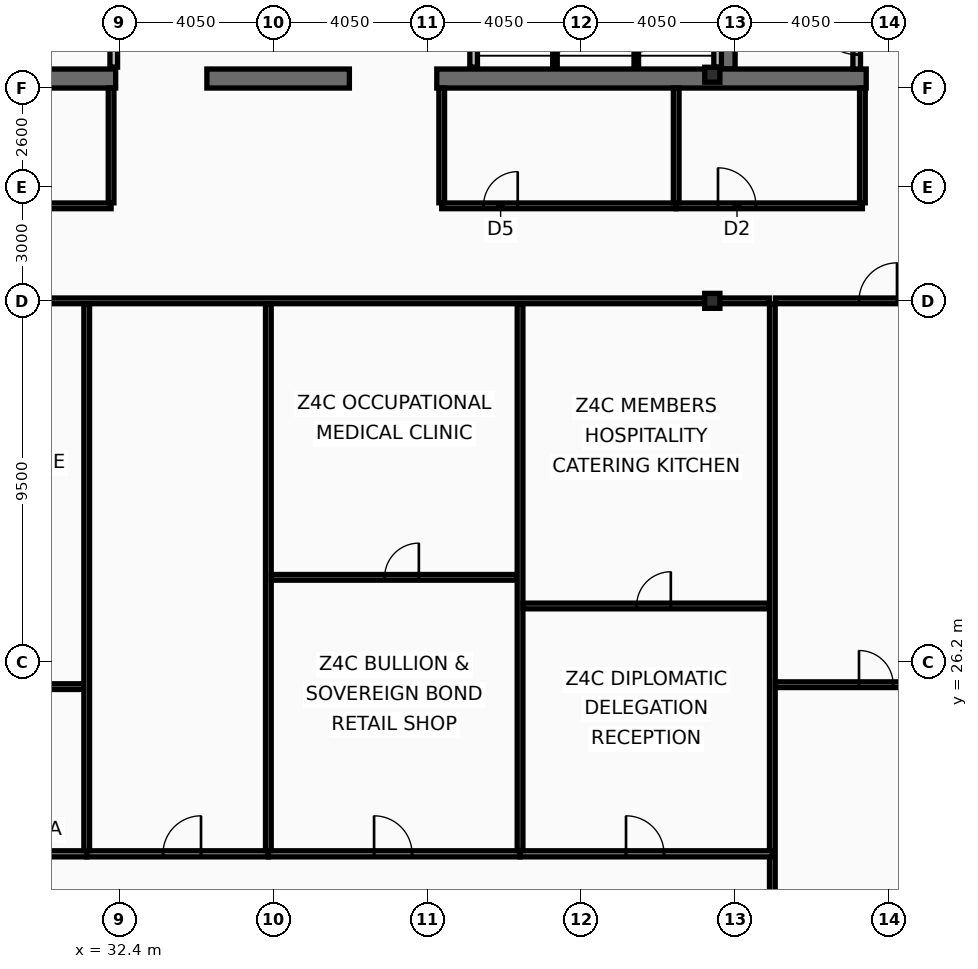
"""IFC4 building model, lengths in metres.
Left out: names, types, materials, properties, quantities, classifications, styles, units other than length and angle.
Written with IfcOpenShell. Run it as: python <this file> out.ifc"""

import sys

from ifc_helpers import new_model, si_unit, direction, frame, frame_2d, origin, origin_2d, place, context, subcontext, project, spatial, rectangle, i_section, extrude, element, fill, save


model = new_model("IFC4")
c1 = context("Model", 3, precision=1e-05, world=origin(), true_north=direction((0.0, 1.0)))
c2 = subcontext(c1, "Body", "Model", "MODEL_VIEW")
j1 = project(units=[si_unit("LENGTHUNIT", "METRE"), si_unit("PLANEANGLEUNIT", "RADIAN")], contexts=[c1])
p1 = place(None, origin())
s1 = spatial("IfcSite", under=j1, at=p1, CompositionType="ELEMENT")
p2 = place(p1, origin())
s2 = spatial("IfcBuilding", under=s1, at=p2, CompositionType="ELEMENT")
p3 = place(p2, frame((0.0, 0.0, 291.4)))
s3 = spatial("IfcBuildingStorey", under=s2, at=p3, CompositionType="ELEMENT", Elevation=291.4)
p4 = place(p3, frame((48.4, 41.8, 0.0), z_axis=(0.0, 0.0, 1.0), x_axis=(0.0, 1.0, 0.0)))
e1 = element("IfcWall", 1, at=p4, inside=s3, PredefinedType="SHEAR", context=c2, shape_type="SweptSolid", body=[
    extrude(rectangle(XDim=11.4, YDim=0.4, at=frame_2d((5.7, 0.0))), origin(), (0.0, 0.0, 1.0), 3.44),
])
p5 = place(p3, frame((32.3, 41.55, 0.0), z_axis=(0.0, 0.0, 1.0), x_axis=(-1.0, 0.0, 0.0)))
e2 = element("IfcWall", 2, at=p5, inside=s3, PredefinedType="SHEAR", context=c2, shape_type="SweptSolid", body=[
    extrude(rectangle(XDim=11.45, YDim=0.5, at=frame_2d((5.725, 0.0))), origin(), (0.0, 0.0, 1.0), 3.44),
])
p6 = place(p3, frame((38.45, 41.55, 0.0), z_axis=(0.0, 0.0, 1.0), x_axis=(-1.0, 0.0, 0.0)))
e3 = element("IfcWall", 3, at=p6, inside=s3, PredefinedType="SHEAR", context=c2, shape_type="SweptSolid", body=[
    extrude(rectangle(XDim=3.75, YDim=0.5, at=frame_2d((1.875, 0.0))), origin(), (0.0, 0.0, 1.0), 3.44),
])
p7 = place(p3, frame((52.05, 41.55, 0.0), z_axis=(0.0, 0.0, 1.0), x_axis=(-1.0, 0.0, 0.0)))
e4 = element("IfcWall", 4, at=p7, inside=s3, PredefinedType="SHEAR", context=c2, shape_type="SweptSolid", body=[
    extrude(rectangle(XDim=11.3, YDim=0.5, at=frame_2d((5.65, 0.0))), origin(), (0.0, 0.0, 1.0), 3.44),
])
for number, where, z_axis, x_axis in (
    (5, (48.0, 35.7, 0.0), (0.0, 0.0, 1.0), (1.0, 0.0, 0.0)),
    (6, (48.0, 41.65, 0.0), (0.0, 0.0, 1.0), (1.0, 0.0, 0.0)),
):
    element("IfcColumn", number, at=place(p3, frame(where, z_axis=z_axis, x_axis=x_axis)), inside=s3, PredefinedType="COLUMN", context=c2, shape_type="SweptSolid", body=[
        extrude(i_section(OverallWidth=0.399, OverallDepth=0.393, WebThickness=0.023, FlangeThickness=0.037, at=origin_2d()), origin(), (0.0, 0.0, 1.0), 3.6),
    ])
p8 = place(p3, frame((51.8, 41.8, 0.0), z_axis=(0.0, 0.0, 1.0), x_axis=(0.0, 1.0, 0.0)))
e7 = element("IfcWall", 7, at=p8, inside=s3, PredefinedType="PARTITIONING", context=c2, shape_type="SweptSolid", body=[
    extrude(rectangle(XDim=2.695, YDim=0.2, at=frame_2d((1.348, 0.0))), origin(), (0.0, 0.0, 1.0), 3.44),
])
p9 = place(p8, frame((0.38, 0.0, 0.0)))
e8 = element("IfcOpeningElement", 8, at=p9, cuts=e7, PredefinedType="OPENING", context=c2, shape_type="SweptSolid", body=[
    extrude(rectangle(XDim=1.05, YDim=2.15, at=frame_2d((0.525, 1.075))), frame((0.0, 0.11, 0.0), z_axis=(0.0, -1.0, 0.0), x_axis=(1.0, 0.0, 0.0)), (0.0, 0.0, 1.0), 0.22),
])
p10 = place(p3, frame((32.25, 41.85, 0.0), z_axis=(0.0, 0.0, 1.0), x_axis=(0.0, 1.0, 0.0)))
e9 = element("IfcWall", 9, at=p10, inside=s3, PredefinedType="PARTITIONING", context=c2, shape_type="SweptSolid", body=[
    extrude(rectangle(XDim=2.395, YDim=0.2, at=frame_2d((1.198, 0.0))), origin(), (0.0, 0.0, 1.0), 3.44),
])
for number, where, z_axis, x_axis in (
    (10, (41.72, 41.85, 0.0), (0.0, 0.0, 1.0), (0.0, 1.0, 0.0)),
    (11, (48.14, 41.85, 0.0), (0.0, 0.0, 1.0), (0.0, 1.0, 0.0)),
):
    element("IfcWall", number, at=place(p3, frame(where, z_axis=z_axis, x_axis=x_axis)), inside=s3, PredefinedType="PARTITIONING", context=c2, shape_type="SweptSolid", body=[
        extrude(rectangle(XDim=2.4, YDim=0.2, at=frame_2d((1.2, 0.0))), origin(), (0.0, 0.0, 1.0), 3.44),
    ])
for number, where, z_axis, x_axis in (
    (12, (43.86, 41.85, 0.0), (0.0, 0.0, 1.0), (0.0, 1.0, 0.0)),
    (13, (46.0, 41.85, 0.0), (0.0, 0.0, 1.0), (0.0, 1.0, 0.0)),
):
    element("IfcWall", number, at=place(p3, frame(where, z_axis=z_axis, x_axis=x_axis)), inside=s3, PredefinedType="PARTITIONING", context=c2, shape_type="SweptSolid", body=[
        extrude(rectangle(XDim=2.4, YDim=0.12, at=frame_2d((1.2, 0.0))), origin(), (0.0, 0.0, 1.0), 3.44),
    ])
p11 = place(p3, frame((28.8, 38.2, 0.0), z_axis=(0.0, 0.0, 1.0), x_axis=(1.0, 0.0, 0.0)))
e14 = element("IfcWall", 14, at=p11, inside=s3, PredefinedType="PARTITIONING", context=c2, shape_type="SweptSolid", body=[
    extrude(rectangle(XDim=3.38, YDim=0.15, at=frame_2d((1.69, 0.0))), origin(), (0.0, 0.0, 1.0), 2.78),
])
p12 = place(p11, frame((0.7, 0.0, 0.0)))
e15 = element("IfcOpeningElement", 15, at=p12, cuts=e14, PredefinedType="OPENING", context=c2, shape_type="SweptSolid", body=[
    extrude(rectangle(XDim=0.95, YDim=2.05, at=frame_2d((0.475, 1.025))), frame((0.0, 0.085, 0.0), z_axis=(0.0, -1.0, 0.0), x_axis=(1.0, 0.0, 0.0)), (0.0, 0.0, 1.0), 0.17),
])
p13 = place(p3, frame((32.18, 38.28, 0.0), z_axis=(0.0, 0.0, 1.0), x_axis=(0.0, 1.0, 0.0)))
e16 = element("IfcWall", 16, at=p13, inside=s3, PredefinedType="PARTITIONING", context=c2, shape_type="SweptSolid", body=[
    extrude(rectangle(XDim=3.02, YDim=0.15, at=frame_2d((1.51, 0.0))), origin(), (0.0, 0.0, 1.0), 3.44),
])
p14 = place(p3, frame((40.88, 38.2, 0.0), z_axis=(0.0, 0.0, 1.0), x_axis=(1.0, 0.0, 0.0)))
e17 = element("IfcWall", 17, at=p14, inside=s3, PredefinedType="PARTITIONING", context=c2, shape_type="SweptSolid", body=[
    extrude(rectangle(XDim=6.17, YDim=0.15, at=frame_2d((3.085, 0.0))), origin(), (0.0, 0.0, 1.0), 2.78),
])
p15 = place(p14, frame((1.1, 0.0, 0.0)))
e18 = element("IfcOpeningElement", 18, at=p15, cuts=e17, PredefinedType="OPENING", context=c2, shape_type="SweptSolid", body=[
    extrude(rectangle(XDim=0.9, YDim=2.05, at=frame_2d((0.45, 1.025))), frame((0.0, 0.085, 0.0), z_axis=(0.0, -1.0, 0.0), x_axis=(1.0, 0.0, 0.0)), (0.0, 0.0, 1.0), 0.17),
])
p16 = place(p3, frame((47.05, 38.2, 0.0), z_axis=(0.0, 0.0, 1.0), x_axis=(1.0, 0.0, 0.0)))
e19 = element("IfcWall", 19, at=p16, inside=s3, PredefinedType="PARTITIONING", context=c2, shape_type="SweptSolid", body=[
    extrude(rectangle(XDim=4.9, YDim=0.15, at=frame_2d((2.45, 0.0))), origin(), (0.0, 0.0, 1.0), 2.78),
])
p17 = place(p16, frame((1.1, 0.0, 0.0)))
e20 = element("IfcOpeningElement", 20, at=p17, cuts=e19, PredefinedType="OPENING", context=c2, shape_type="SweptSolid", body=[
    extrude(rectangle(XDim=1.0, YDim=2.05, at=frame_2d((0.5, 1.025))), frame((0.0, 0.085, 0.0), z_axis=(0.0, -1.0, 0.0), x_axis=(1.0, 0.0, 0.0)), (0.0, 0.0, 1.0), 0.17),
])
for number, where, z_axis, x_axis in (
    (21, (40.88, 38.28, 0.0), (0.0, 0.0, 1.0), (0.0, 1.0, 0.0)),
    (22, (47.05, 38.28, 0.0), (0.0, 0.0, 1.0), (0.0, 1.0, 0.0)),
    (23, (51.95, 38.28, 0.0), (0.0, 0.0, 1.0), (0.0, 1.0, 0.0)),
):
    element("IfcWall", number, at=place(p3, frame(where, z_axis=z_axis, x_axis=x_axis)), inside=s3, PredefinedType="PARTITIONING", context=c2, shape_type="SweptSolid", body=[
        extrude(rectangle(XDim=3.02, YDim=0.15, at=frame_2d((1.51, 0.0))), origin(), (0.0, 0.0, 1.0), 3.44),
    ])
p18 = place(p3, frame((49.58, 10.665, 0.0), z_axis=(0.0, 0.0, 1.0), x_axis=(0.0, 1.0, 0.0)))
e24 = element("IfcWall", 24, at=p18, inside=s3, PredefinedType="PARTITIONING", context=c2, shape_type="SweptSolid", body=[
    extrude(rectangle(XDim=24.955, YDim=0.15, at=frame_2d((12.478, 0.0))), origin(), (0.0, 0.0, 1.0), 3.03),
])
p19 = place(p18, frame((3.2, 0.0, 0.0)))
e25 = element("IfcOpeningElement", 25, at=p19, cuts=e24, PredefinedType="OPENING", context=c2, shape_type="SweptSolid", body=[
    extrude(rectangle(XDim=1.1, YDim=2.1, at=frame_2d((0.55, 1.05))), frame((0.0, 0.085, 0.0), z_axis=(0.0, -1.0, 0.0), x_axis=(1.0, 0.0, 0.0)), (0.0, 0.0, 1.0), 0.17),
])
p20 = place(p3, frame((24.48, 35.7, 0.0), z_axis=(0.0, 0.0, 1.0), x_axis=(1.0, 0.0, 0.0)))
e26 = element("IfcWall", 26, at=p20, inside=s3, PredefinedType="PARTITIONING", context=c2, shape_type="SweptSolid", body=[
    extrude(rectangle(XDim=25.02, YDim=0.15, at=frame_2d((12.51, 0.0))), origin(), (0.0, 0.0, 1.0), 2.78),
])
p21 = place(p3, frame((49.66, 35.7, 0.0), z_axis=(0.0, 0.0, 1.0), x_axis=(1.0, 0.0, 0.0)))
e27 = element("IfcWall", 27, at=p21, inside=s3, PredefinedType="PARTITIONING", context=c2, shape_type="SweptSolid", body=[
    extrude(rectangle(XDim=11.145, YDim=0.15, at=frame_2d((5.573, 0.0))), origin(), (0.0, 0.0, 1.0), 2.78),
])
p22 = place(p21, frame((2.2, 0.0, 0.0)))
e28 = element("IfcOpeningElement", 28, at=p22, cuts=e27, PredefinedType="OPENING", context=c2, shape_type="SweptSolid", body=[
    extrude(rectangle(XDim=1.0, YDim=2.05, at=frame_2d((0.5, 1.025))), frame((0.0, 0.085, 0.0), z_axis=(0.0, -1.0, 0.0), x_axis=(1.0, 0.0, 0.0)), (0.0, 0.0, 1.0), 0.17),
])
p23 = place(p3, frame((49.66, 25.6, 0.0), z_axis=(0.0, 0.0, 1.0), x_axis=(1.0, 0.0, 0.0)))
e29 = element("IfcWall", 29, at=p23, inside=s3, PredefinedType="PARTITIONING", context=c2, shape_type="SweptSolid", body=[
    extrude(rectangle(XDim=11.145, YDim=0.15, at=frame_2d((5.573, 0.0))), origin(), (0.0, 0.0, 1.0), 2.78),
])
p24 = place(p23, frame((2.2, 0.0, 0.0)))
e30 = element("IfcOpeningElement", 30, at=p24, cuts=e29, PredefinedType="OPENING", context=c2, shape_type="SweptSolid", body=[
    extrude(rectangle(XDim=0.9, YDim=2.05, at=frame_2d((0.45, 1.025))), frame((0.0, 0.085, 0.0), z_axis=(0.0, -1.0, 0.0), x_axis=(1.0, 0.0, 0.0)), (0.0, 0.0, 1.0), 0.17),
])
p25 = place(p3, frame((24.4, 21.15, 0.0), z_axis=(0.0, 0.0, 1.0), x_axis=(1.0, 0.0, 0.0)))
e31 = element("IfcWall", 31, at=p25, inside=s3, PredefinedType="PARTITIONING", context=c2, shape_type="SweptSolid", body=[
    extrude(rectangle(XDim=7.138, YDim=0.16, at=frame_2d((3.569, 0.0))), origin(), (0.0, 0.0, 1.0), 2.78),
])
p26 = place(p25, frame((2.998, 0.0, 0.0)))
e32 = element("IfcOpeningElement", 32, at=p26, cuts=e31, PredefinedType="OPENING", context=c2, shape_type="SweptSolid", body=[
    extrude(rectangle(XDim=1.0, YDim=2.05, at=frame_2d((0.5, 1.025))), frame((0.0, 0.09, 0.0), z_axis=(0.0, -1.0, 0.0), x_axis=(1.0, 0.0, 0.0)), (0.0, 0.0, 1.0), 0.18),
])
p27 = place(p3, frame((24.48, 25.55, 0.0), z_axis=(0.0, 0.0, 1.0), x_axis=(1.0, 0.0, 0.0)))
e33 = element("IfcWall", 33, at=p27, inside=s3, PredefinedType="PARTITIONING", context=c2, shape_type="SweptSolid", body=[
    extrude(rectangle(XDim=6.978, YDim=0.15, at=frame_2d((3.489, 0.0))), origin(), (0.0, 0.0, 1.0), 2.78),
])
p28 = place(p27, frame((3.212, 0.0, 0.0)))
e34 = element("IfcOpeningElement", 34, at=p28, cuts=e33, PredefinedType="OPENING", context=c2, shape_type="SweptSolid", body=[
    extrude(rectangle(XDim=0.9, YDim=2.05, at=frame_2d((0.45, 1.025))), frame((0.0, 0.085, 0.0), z_axis=(0.0, -1.0, 0.0), x_axis=(1.0, 0.0, 0.0)), (0.0, 0.0, 1.0), 0.17),
])
p29 = place(p3, frame((31.538, 21.15, 0.0), z_axis=(0.0, 0.0, 1.0), x_axis=(1.0, 0.0, 0.0)))
e35 = element("IfcWall", 35, at=p29, inside=s3, PredefinedType="PARTITIONING", context=c2, shape_type="SweptSolid", body=[
    extrude(rectangle(XDim=4.78, YDim=0.16, at=frame_2d((2.39, 0.0))), origin(), (0.0, 0.0, 1.0), 3.44),
])
p30 = place(p29, frame((2.008, 0.0, 0.0)))
e36 = element("IfcOpeningElement", 36, at=p30, cuts=e35, PredefinedType="OPENING", context=c2, shape_type="SweptSolid", body=[
    extrude(rectangle(XDim=1.0, YDim=2.05, at=frame_2d((0.5, 1.025))), frame((0.0, 0.09, 0.0), z_axis=(0.0, -1.0, 0.0), x_axis=(1.0, 0.0, 0.0)), (0.0, 0.0, 1.0), 0.18),
])
p31 = place(p3, frame((31.538, 21.235, 0.0), z_axis=(0.0, 0.0, 1.0), x_axis=(0.0, 1.0, 0.0)))
e37 = element("IfcWall", 37, at=p31, inside=s3, PredefinedType="PARTITIONING", context=c2, shape_type="SweptSolid", body=[
    extrude(rectangle(XDim=14.385, YDim=0.15, at=frame_2d((7.192, 0.0))), origin(), (0.0, 0.0, 1.0), 3.03),
])
p32 = place(p3, frame((36.318, 21.15, 0.0), z_axis=(0.0, 0.0, 1.0), x_axis=(1.0, 0.0, 0.0)))
e38 = element("IfcWall", 38, at=p32, inside=s3, PredefinedType="PARTITIONING", context=c2, shape_type="SweptSolid", body=[
    extrude(rectangle(XDim=6.623, YDim=0.16, at=frame_2d((3.312, 0.0))), origin(), (0.0, 0.0, 1.0), 2.78),
])
p33 = place(p32, frame((2.782, 0.0, 0.0)))
e39 = element("IfcOpeningElement", 39, at=p33, cuts=e38, PredefinedType="OPENING", context=c2, shape_type="SweptSolid", body=[
    extrude(rectangle(XDim=1.0, YDim=2.05, at=frame_2d((0.5, 1.025))), frame((0.0, 0.09, 0.0), z_axis=(0.0, -1.0, 0.0), x_axis=(1.0, 0.0, 0.0)), (0.0, 0.0, 1.0), 0.18),
])
p34 = place(p3, frame((36.318, 21.235, 0.0), z_axis=(0.0, 0.0, 1.0), x_axis=(0.0, 1.0, 0.0)))
e40 = element("IfcWall", 40, at=p34, inside=s3, PredefinedType="PARTITIONING", context=c2, shape_type="SweptSolid", body=[
    extrude(rectangle(XDim=14.385, YDim=0.15, at=frame_2d((7.192, 0.0))), origin(), (0.0, 0.0, 1.0), 3.03),
])
p35 = place(p3, frame((36.398, 28.425, 0.0), z_axis=(0.0, 0.0, 1.0), x_axis=(1.0, 0.0, 0.0)))
e41 = element("IfcWall", 41, at=p35, inside=s3, PredefinedType="PARTITIONING", context=c2, shape_type="SweptSolid", body=[
    extrude(rectangle(XDim=6.463, YDim=0.15, at=frame_2d((3.231, 0.0))), origin(), (0.0, 0.0, 1.0), 2.78),
])
p36 = place(p35, frame((2.98, 0.0, 0.0)))
e42 = element("IfcOpeningElement", 42, at=p36, cuts=e41, PredefinedType="OPENING", context=c2, shape_type="SweptSolid", body=[
    extrude(rectangle(XDim=0.9, YDim=2.05, at=frame_2d((0.45, 1.025))), frame((0.0, 0.085, 0.0), z_axis=(0.0, -1.0, 0.0), x_axis=(1.0, 0.0, 0.0)), (0.0, 0.0, 1.0), 0.17),
])
p37 = place(p3, frame((42.941, 21.15, 0.0), z_axis=(0.0, 0.0, 1.0), x_axis=(1.0, 0.0, 0.0)))
e43 = element("IfcWall", 43, at=p37, inside=s3, PredefinedType="PARTITIONING", context=c2, shape_type="SweptSolid", body=[
    extrude(rectangle(XDim=6.639, YDim=0.16, at=frame_2d((3.319, 0.0))), origin(), (0.0, 0.0, 1.0), 2.78),
])
p38 = place(p37, frame((2.788, 0.0, 0.0)))
e44 = element("IfcOpeningElement", 44, at=p38, cuts=e43, PredefinedType="OPENING", context=c2, shape_type="SweptSolid", body=[
    extrude(rectangle(XDim=1.0, YDim=2.05, at=frame_2d((0.5, 1.025))), frame((0.0, 0.09, 0.0), z_axis=(0.0, -1.0, 0.0), x_axis=(1.0, 0.0, 0.0)), (0.0, 0.0, 1.0), 0.18),
])
p39 = place(p3, frame((42.941, 21.235, 0.0), z_axis=(0.0, 0.0, 1.0), x_axis=(0.0, 1.0, 0.0)))
e45 = element("IfcWall", 45, at=p39, inside=s3, PredefinedType="PARTITIONING", context=c2, shape_type="SweptSolid", body=[
    extrude(rectangle(XDim=14.385, YDim=0.15, at=frame_2d((7.192, 0.0))), origin(), (0.0, 0.0, 1.0), 2.78),
])
p40 = place(p3, frame((43.021, 27.672, 0.0), z_axis=(0.0, 0.0, 1.0), x_axis=(1.0, 0.0, 0.0)))
e46 = element("IfcWall", 46, at=p40, inside=s3, PredefinedType="PARTITIONING", context=c2, shape_type="SweptSolid", body=[
    extrude(rectangle(XDim=6.479, YDim=0.15, at=frame_2d((3.24, 0.0))), origin(), (0.0, 0.0, 1.0), 2.78),
])
p41 = place(p40, frame((2.988, 0.0, 0.0)))
e47 = element("IfcOpeningElement", 47, at=p41, cuts=e46, PredefinedType="OPENING", context=c2, shape_type="SweptSolid", body=[
    extrude(rectangle(XDim=0.9, YDim=2.05, at=frame_2d((0.45, 1.025))), frame((0.0, 0.085, 0.0), z_axis=(0.0, -1.0, 0.0), x_axis=(1.0, 0.0, 0.0)), (0.0, 0.0, 1.0), 0.17),
])
p42 = place(p9, origin())
e48 = element("IfcDoor", 48, at=p42, inside=s3, OperationType="SINGLE_SWING_RIGHT", PredefinedType="DOOR", context=c2, shape_type="SweptSolid", body=[
    extrude(rectangle(XDim=1.05, YDim=2.15, at=frame_2d((0.525, 1.075))), frame((0.0, 0.025, 0.0), z_axis=(0.0, -1.0, 0.0), x_axis=(1.0, 0.0, 0.0)), (0.0, 0.0, 1.0), 0.05),
])
fill(e8, e48)
p43 = place(p15, origin())
e49 = element("IfcDoor", 49, at=p43, inside=s3, OperationType="SINGLE_SWING_RIGHT", PredefinedType="DOOR", context=c2, shape_type="SweptSolid", body=[
    extrude(rectangle(XDim=0.9, YDim=2.05, at=frame_2d((0.45, 1.025))), frame((0.0, 0.025, 0.0), z_axis=(0.0, -1.0, 0.0), x_axis=(1.0, 0.0, 0.0)), (0.0, 0.0, 1.0), 0.05),
])
fill(e18, e49)
p44 = place(p17, origin())
e50 = element("IfcDoor", 50, at=p44, inside=s3, OperationType="SINGLE_SWING_LEFT", PredefinedType="DOOR", context=c2, shape_type="SweptSolid", body=[
    extrude(rectangle(XDim=1.0, YDim=2.05, at=frame_2d((0.5, 1.025))), frame((0.0, 0.025, 0.0), z_axis=(0.0, -1.0, 0.0), x_axis=(1.0, 0.0, 0.0)), (0.0, 0.0, 1.0), 0.05),
])
fill(e20, e50)
p45 = place(p22, origin())
e51 = element("IfcDoor", 51, at=p45, inside=s3, OperationType="SINGLE_SWING_RIGHT", PredefinedType="DOOR", context=c2, shape_type="SweptSolid", body=[
    extrude(rectangle(XDim=1.0, YDim=2.05, at=frame_2d((0.5, 1.025))), frame((0.0, 0.025, 0.0), z_axis=(0.0, -1.0, 0.0), x_axis=(1.0, 0.0, 0.0)), (0.0, 0.0, 1.0), 0.05),
])
fill(e28, e51)
p46 = place(p24, origin())
e52 = element("IfcDoor", 52, at=p46, inside=s3, OperationType="SINGLE_SWING_LEFT", PredefinedType="DOOR", context=c2, shape_type="SweptSolid", body=[
    extrude(rectangle(XDim=0.9, YDim=2.05, at=frame_2d((0.45, 1.025))), frame((0.0, 0.025, 0.0), z_axis=(0.0, -1.0, 0.0), x_axis=(1.0, 0.0, 0.0)), (0.0, 0.0, 1.0), 0.05),
])
fill(e30, e52)
p47 = place(p30, origin())
e53 = element("IfcDoor", 53, at=p47, inside=s3, OperationType="SINGLE_SWING_RIGHT", PredefinedType="DOOR", context=c2, shape_type="SweptSolid", body=[
    extrude(rectangle(XDim=1.0, YDim=2.05, at=frame_2d((0.5, 1.025))), frame((0.0, 0.025, 0.0), z_axis=(0.0, -1.0, 0.0), x_axis=(1.0, 0.0, 0.0)), (0.0, 0.0, 1.0), 0.05),
])
fill(e36, e53)
p48 = place(p33, origin())
e54 = element("IfcDoor", 54, at=p48, inside=s3, OperationType="SINGLE_SWING_LEFT", PredefinedType="DOOR", context=c2, shape_type="SweptSolid", body=[
    extrude(rectangle(XDim=1.0, YDim=2.05, at=frame_2d((0.5, 1.025))), frame((0.0, 0.025, 0.0), z_axis=(0.0, -1.0, 0.0), x_axis=(1.0, 0.0, 0.0)), (0.0, 0.0, 1.0), 0.05),
])
fill(e39, e54)
p49 = place(p36, origin())
e55 = element("IfcDoor", 55, at=p49, inside=s3, OperationType="SINGLE_SWING_RIGHT", PredefinedType="DOOR", context=c2, shape_type="SweptSolid", body=[
    extrude(rectangle(XDim=0.9, YDim=2.05, at=frame_2d((0.45, 1.025))), frame((0.0, 0.025, 0.0), z_axis=(0.0, -1.0, 0.0), x_axis=(1.0, 0.0, 0.0)), (0.0, 0.0, 1.0), 0.05),
])
fill(e42, e55)
p50 = place(p38, origin())
e56 = element("IfcDoor", 56, at=p50, inside=s3, OperationType="SINGLE_SWING_LEFT", PredefinedType="DOOR", context=c2, shape_type="SweptSolid", body=[
    extrude(rectangle(XDim=1.0, YDim=2.05, at=frame_2d((0.5, 1.025))), frame((0.0, 0.025, 0.0), z_axis=(0.0, -1.0, 0.0), x_axis=(1.0, 0.0, 0.0)), (0.0, 0.0, 1.0), 0.05),
])
fill(e44, e56)
p51 = place(p41, origin())
e57 = element("IfcDoor", 57, at=p51, inside=s3, OperationType="SINGLE_SWING_RIGHT", PredefinedType="DOOR", context=c2, shape_type="SweptSolid", body=[
    extrude(rectangle(XDim=0.9, YDim=2.05, at=frame_2d((0.45, 1.025))), frame((0.0, 0.025, 0.0), z_axis=(0.0, -1.0, 0.0), x_axis=(1.0, 0.0, 0.0)), (0.0, 0.0, 1.0), 0.05),
])
fill(e47, e57)
save(model, sys.argv[1])
